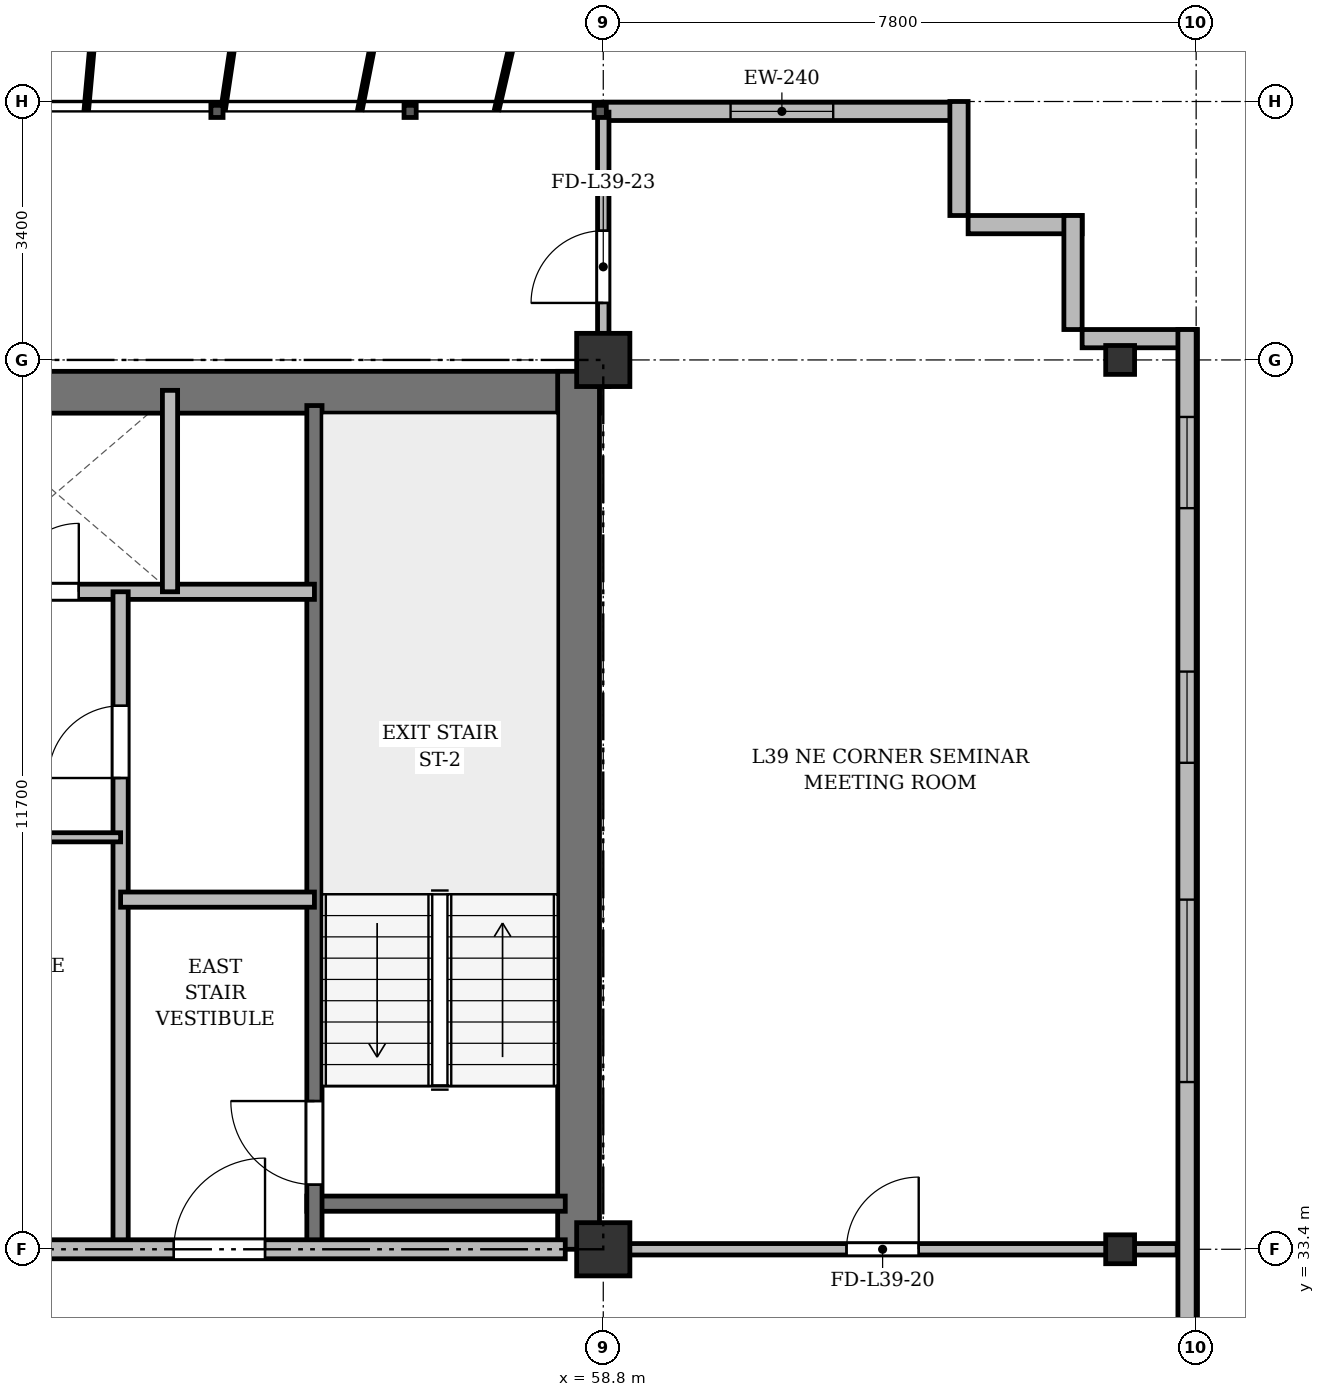
"""IFC4 building model, lengths in metres.
Left out: names, types, materials, properties, quantities, classifications, styles, units other than length and angle.
Written with IfcOpenShell. Run it as: python <this file> out.ifc"""

import sys

from ifc_helpers import new_model, si_unit, direction, frame, frame_2d, origin, origin_2d, place, context, subcontext, project, spatial, rectangle, i_section, extrude, source, transform, mapped, element, fill, save


model = new_model("IFC4")
c1 = context("Model", 3, precision=1e-05, world=origin(), true_north=direction((0.0, 1.0)))
c2 = subcontext(c1, "Body", "Model", "MODEL_VIEW")
j1 = project(units=[si_unit("LENGTHUNIT", "METRE"), si_unit("PLANEANGLEUNIT", "RADIAN")], contexts=[c1])
p1 = place(None, origin())
s1 = spatial("IfcSite", under=j1, at=p1, CompositionType="ELEMENT")
p2 = place(p1, origin())
s2 = spatial("IfcBuilding", under=s1, at=p2, CompositionType="ELEMENT")
p3 = place(p2, frame((0.0, 0.0, 150.1)))
s3 = spatial("IfcBuildingStorey", under=s2, at=p3, CompositionType="ELEMENT", Elevation=150.1)
m1 = source(origin(), c2, "Body", "SweptSolid", [
    extrude(rectangle(XDim=0.7, YDim=0.7, at=origin_2d()), origin(), (0.0, 0.0, 1.0), 3.6),
])
for number, where, z_axis, x_axis in (
    (1, (58.8, 33.4, 0.0), (0.0, 0.0, 1.0), (1.0, 0.0, 0.0)),
    (2, (58.8, 45.1, 0.0), (0.0, 0.0, 1.0), (1.0, 0.0, 0.0)),
):
    element("IfcColumn", number, at=place(p3, frame(where, z_axis=z_axis, x_axis=x_axis)), inside=s3, PredefinedType="COLUMN", context=c2, shape_type="MappedRepresentation", body=[
        mapped(m1, transform((0.0, 0.0, 0.0), x_axis=(1.0, 0.0, 0.0), y_axis=(0.0, 1.0, 0.0), z_axis=(0.0, 0.0, 1.0), scale=1.0)),
    ])
m2 = source(origin(), c2, "Body", "SweptSolid", [
    extrude(i_section(OverallWidth=0.38, OverallDepth=0.38, WebThickness=0.02, FlangeThickness=0.03, at=origin_2d()), origin(), (0.0, 0.0, 1.0), 3.6),
])
for number, where, z_axis, x_axis in (
    (3, (65.6, 33.4, 0.0), (0.0, 0.0, 1.0), (1.0, 0.0, 0.0)),
    (4, (65.6, 45.1, 0.0), (0.0, 0.0, 1.0), (1.0, 0.0, 0.0)),
):
    element("IfcColumn", number, at=place(p3, frame(where, z_axis=z_axis, x_axis=x_axis)), inside=s3, PredefinedType="COLUMN", context=c2, shape_type="MappedRepresentation", body=[
        mapped(m2, transform((0.0, 0.0, 0.0), x_axis=(1.0, 0.0, 0.0), y_axis=(0.0, 1.0, 0.0), z_axis=(0.0, 0.0, 1.0), scale=1.0)),
    ])
p4 = place(p3, frame((58.8, 48.37, 0.0), z_axis=(0.0, 0.0, 1.0), x_axis=(1.0, 0.0, 0.0)))
e5 = element("IfcWall", 5, at=p4, inside=s3, PredefinedType="SOLIDWALL", context=c2, shape_type="SweptSolid", body=[
    extrude(rectangle(XDim=4.7, YDim=0.24, at=frame_2d((2.35, 0.0))), origin(), (0.0, 0.0, 1.0), 3.35),
])
p5 = place(p4, frame((1.675, 0.0, 0.9)))
e6 = element("IfcOpeningElement", 6, at=p5, cuts=e5, PredefinedType="OPENING", context=c2, shape_type="SweptSolid", body=[
    extrude(rectangle(XDim=1.35, YDim=1.5, at=frame_2d((0.675, 0.75))), frame((0.0, 0.13, 0.0), z_axis=(0.0, -1.0, 0.0), x_axis=(1.0, 0.0, 0.0)), (0.0, 0.0, 1.0), 0.26),
])
for number, where, z_axis, x_axis in (
    (7, (63.48, 48.5, 0.0), (0.0, 0.0, 1.0), (0.0, -1.0, 0.0)),
    (8, (63.6, 46.88, 0.0), (0.0, 0.0, 1.0), (1.0, 0.0, 0.0)),
    (9, (64.98, 47.0, 0.0), (0.0, 0.0, 1.0), (0.0, -1.0, 0.0)),
    (10, (65.1, 45.38, 0.0), (0.0, 0.0, 1.0), (1.0, 0.0, 0.0)),
):
    element("IfcWall", number, at=place(p3, frame(where, z_axis=z_axis, x_axis=x_axis)), inside=s3, PredefinedType="SOLIDWALL", context=c2, shape_type="SweptSolid", body=[
        extrude(rectangle(XDim=1.5, YDim=0.24, at=frame_2d((0.75, 0.0))), origin(), (0.0, 0.0, 1.0), 3.35),
    ])
p6 = place(p3, frame((66.48, 45.5, 0.0), z_axis=(0.0, 0.0, 1.0), x_axis=(0.0, -1.0, 0.0)))
e11 = element("IfcWall", 11, at=p6, inside=s3, PredefinedType="SOLIDWALL", context=c2, shape_type="SweptSolid", body=[
    extrude(rectangle(XDim=39.2, YDim=0.24, at=frame_2d((19.6, 0.0))), origin(), (0.0, 0.0, 1.0), 3.35),
])
p7 = place(p6, frame((36.55, 0.0, 0.92)))
e12 = element("IfcOpeningElement", 12, at=p7, cuts=e11, PredefinedType="OPENING", context=c2, shape_type="SweptSolid", body=[
    extrude(rectangle(XDim=1.2, YDim=1.65, at=frame_2d((0.6, 0.825))), frame((0.0, 0.13, 0.0), z_axis=(0.0, -1.0, 0.0), x_axis=(1.0, 0.0, 0.0)), (0.0, 0.0, 1.0), 0.26),
])
p8 = place(p6, frame((32.9, 0.0, 0.92)))
e13 = element("IfcOpeningElement", 13, at=p8, cuts=e11, PredefinedType="OPENING", context=c2, shape_type="SweptSolid", body=[
    extrude(rectangle(XDim=2.4, YDim=2.1, at=frame_2d((1.2, 1.05))), frame((0.0, 0.13, 0.0), z_axis=(0.0, -1.0, 0.0), x_axis=(1.0, 0.0, 0.0)), (0.0, 0.0, 1.0), 0.26),
])
p9 = place(p6, frame((28.7, 0.0, 0.92)))
e14 = element("IfcOpeningElement", 14, at=p9, cuts=e11, PredefinedType="OPENING", context=c2, shape_type="SweptSolid", body=[
    extrude(rectangle(XDim=2.4, YDim=2.1, at=frame_2d((1.2, 1.05))), frame((0.0, 0.13, 0.0), z_axis=(0.0, -1.0, 0.0), x_axis=(1.0, 0.0, 0.0)), (0.0, 0.0, 1.0), 0.26),
])
p10 = place(p6, frame((21.5, 0.0, 0.92)))
e15 = element("IfcOpeningElement", 15, at=p10, cuts=e11, PredefinedType="OPENING", context=c2, shape_type="SweptSolid", body=[
    extrude(rectangle(XDim=2.4, YDim=2.1, at=frame_2d((1.2, 1.05))), frame((0.0, 0.13, 0.0), z_axis=(0.0, -1.0, 0.0), x_axis=(1.0, 0.0, 0.0)), (0.0, 0.0, 1.0), 0.26),
])
p11 = place(p6, frame((7.5, 0.0, 0.92)))
e16 = element("IfcOpeningElement", 16, at=p11, cuts=e11, PredefinedType="OPENING", context=c2, shape_type="SweptSolid", body=[
    extrude(rectangle(XDim=2.4, YDim=2.1, at=frame_2d((1.2, 1.05))), frame((0.0, 0.13, 0.0), z_axis=(0.0, -1.0, 0.0), x_axis=(1.0, 0.0, 0.0)), (0.0, 0.0, 1.0), 0.26),
])
p12 = place(p6, frame((4.5, 0.0, 0.92)))
e17 = element("IfcOpeningElement", 17, at=p12, cuts=e11, PredefinedType="OPENING", context=c2, shape_type="SweptSolid", body=[
    extrude(rectangle(XDim=1.2, YDim=1.65, at=frame_2d((0.6, 0.825))), frame((0.0, 0.13, 0.0), z_axis=(0.0, -1.0, 0.0), x_axis=(1.0, 0.0, 0.0)), (0.0, 0.0, 1.0), 0.26),
])
p13 = place(p6, frame((1.15, 0.0, 0.92)))
e18 = element("IfcOpeningElement", 18, at=p13, cuts=e11, PredefinedType="OPENING", context=c2, shape_type="SweptSolid", body=[
    extrude(rectangle(XDim=1.2, YDim=1.65, at=frame_2d((0.6, 0.825))), frame((0.0, 0.13, 0.0), z_axis=(0.0, -1.0, 0.0), x_axis=(1.0, 0.0, 0.0)), (0.0, 0.0, 1.0), 0.26),
])
p14 = place(p3, frame((15.65, 44.675, 0.0), z_axis=(0.0, 0.0, 1.0), x_axis=(1.0, 0.0, 0.0)))
e19 = element("IfcWall", 19, at=p14, inside=s3, PredefinedType="SHEAR", context=c2, shape_type="SweptSolid", body=[
    extrude(rectangle(XDim=43.1, YDim=0.55, at=frame_2d((21.55, 0.0))), origin(), (0.0, 0.0, 1.0), 3.35),
])
p15 = place(p3, frame((58.475, 33.4, 0.0), z_axis=(0.0, 0.0, 1.0), x_axis=(0.0, 1.0, 0.0)))
e20 = element("IfcWall", 20, at=p15, inside=s3, PredefinedType="SHEAR", context=c2, shape_type="SweptSolid", body=[
    extrude(rectangle(XDim=11.55, YDim=0.55, at=frame_2d((5.775, 0.0))), origin(), (0.0, 0.0, 1.0), 3.35),
])
p16 = place(p3, frame((54.9, 34.0, 0.0), z_axis=(0.0, 0.0, 1.0), x_axis=(1.0, 0.0, 0.0)))
e21 = element("IfcWall", 21, at=p16, inside=s3, PredefinedType="SHEAR", context=c2, shape_type="SweptSolid", body=[
    extrude(rectangle(XDim=3.4, YDim=0.2, at=frame_2d((1.7, 0.0))), origin(), (0.0, 0.0, 1.0), 3.35),
])
p17 = place(p3, frame((55.0, 33.4, 0.0), z_axis=(0.0, 0.0, 1.0), x_axis=(0.0, 1.0, 0.0)))
e22 = element("IfcWall", 22, at=p17, inside=s3, PredefinedType="SHEAR", context=c2, shape_type="SweptSolid", body=[
    extrude(rectangle(XDim=11.1, YDim=0.2, at=frame_2d((5.55, 0.0))), origin(), (0.0, 0.0, 1.0), 3.35),
])
p18 = place(p17, frame((0.85, 0.0, 0.0)))
e23 = element("IfcOpeningElement", 23, at=p18, cuts=e22, PredefinedType="OPENING", context=c2, shape_type="SweptSolid", body=[
    extrude(rectangle(XDim=1.1, YDim=2.15, at=frame_2d((0.55, 1.075))), frame((0.0, 0.11, 0.0), z_axis=(0.0, -1.0, 0.0), x_axis=(1.0, 0.0, 0.0)), (0.0, 0.0, 1.0), 0.22),
])
p19 = place(p3, frame((47.15, 42.05, 0.0), z_axis=(0.0, 0.0, 1.0), x_axis=(1.0, 0.0, 0.0)))
e24 = element("IfcWall", 24, at=p19, inside=s3, PredefinedType="SOLIDWALL", context=c2, shape_type="SweptSolid", body=[
    extrude(rectangle(XDim=7.85, YDim=0.2, at=frame_2d((3.925, 0.0))), origin(), (0.0, 0.0, 1.0), 2.85),
])
p20 = place(p19, frame((0.75, 0.0, 0.0)))
e25 = element("IfcOpeningElement", 25, at=p20, cuts=e24, PredefinedType="OPENING", context=c2, shape_type="SweptSolid", body=[
    extrude(rectangle(XDim=0.9, YDim=2.1, at=frame_2d((0.45, 1.05))), frame((0.0, 0.11, 0.0), z_axis=(0.0, -1.0, 0.0), x_axis=(1.0, 0.0, 0.0)), (0.0, 0.0, 1.0), 0.22),
])
p21 = place(p19, frame((3.85, 0.0, 0.0)))
e26 = element("IfcOpeningElement", 26, at=p21, cuts=e24, PredefinedType="OPENING", context=c2, shape_type="SweptSolid", body=[
    extrude(rectangle(XDim=0.9, YDim=2.1, at=frame_2d((0.45, 1.05))), frame((0.0, 0.11, 0.0), z_axis=(0.0, -1.0, 0.0), x_axis=(1.0, 0.0, 0.0)), (0.0, 0.0, 1.0), 0.22),
])
p22 = place(p3, frame((53.1, 42.05, 0.0), z_axis=(0.0, 0.0, 1.0), x_axis=(0.0, 1.0, 0.0)))
e27 = element("IfcWall", 27, at=p22, inside=s3, PredefinedType="SOLIDWALL", context=c2, shape_type="SweptSolid", body=[
    extrude(rectangle(XDim=2.65, YDim=0.2, at=frame_2d((1.325, 0.0))), origin(), (0.0, 0.0, 1.0), 3.35),
])
p23 = place(p3, frame((52.45, 33.4, 0.0), z_axis=(0.0, 0.0, 1.0), x_axis=(0.0, 1.0, 0.0)))
e28 = element("IfcWall", 28, at=p23, inside=s3, PredefinedType="PARTITIONING", context=c2, shape_type="SweptSolid", body=[
    extrude(rectangle(XDim=8.65, YDim=0.2, at=frame_2d((4.325, 0.0))), origin(), (0.0, 0.0, 1.0), 2.75),
])
p24 = place(p23, frame((6.2, 0.0, 0.0)))
e29 = element("IfcOpeningElement", 29, at=p24, cuts=e28, PredefinedType="OPENING", context=c2, shape_type="SweptSolid", body=[
    extrude(rectangle(XDim=0.95, YDim=2.15, at=frame_2d((0.475, 1.075))), frame((0.0, 0.11, 0.0), z_axis=(0.0, -1.0, 0.0), x_axis=(1.0, 0.0, 0.0)), (0.0, 0.0, 1.0), 0.22),
])
p25 = place(p3, frame((52.45, 38.0, 0.0), z_axis=(0.0, 0.0, 1.0), x_axis=(1.0, 0.0, 0.0)))
e30 = element("IfcWall", 30, at=p25, inside=s3, PredefinedType="PARTITIONING", context=c2, shape_type="SweptSolid", body=[
    extrude(rectangle(XDim=2.55, YDim=0.2, at=frame_2d((1.275, 0.0))), origin(), (0.0, 0.0, 1.0), 3.35),
])
p26 = place(p3, frame((49.32, 38.82, 0.0), z_axis=(0.0, 0.0, 1.0), x_axis=(1.0, 0.0, 0.0)))
e31 = element("IfcWall", 31, at=p26, inside=s3, PredefinedType="PARTITIONING", context=c2, shape_type="SweptSolid", body=[
    extrude(rectangle(XDim=3.13, YDim=0.12, at=frame_2d((1.565, 0.0))), origin(), (0.0, 0.0, 1.0), 2.85),
])
p27 = place(p3, frame((47.15, 33.4, 0.0), z_axis=(0.0, 0.0, 1.0), x_axis=(1.0, 0.0, 0.0)))
e32 = element("IfcWall", 32, at=p27, inside=s3, PredefinedType="PARTITIONING", context=c2, shape_type="SweptSolid", body=[
    extrude(rectangle(XDim=11.15, YDim=0.25, at=frame_2d((5.575, 0.0))), origin(), (0.0, 0.0, 1.0), 2.75),
])
p28 = place(p27, frame((0.7, 0.0, 0.0)))
e33 = element("IfcOpeningElement", 33, at=p28, cuts=e32, PredefinedType="OPENING", context=c2, shape_type="SweptSolid", body=[
    extrude(rectangle(XDim=0.95, YDim=2.15, at=frame_2d((0.475, 1.075))), frame((0.0, 0.135, 0.0), z_axis=(0.0, -1.0, 0.0), x_axis=(1.0, 0.0, 0.0)), (0.0, 0.0, 1.0), 0.27),
])
p29 = place(p27, frame((6.0, 0.0, 0.0)))
e34 = element("IfcOpeningElement", 34, at=p29, cuts=e32, PredefinedType="OPENING", context=c2, shape_type="SweptSolid", body=[
    extrude(rectangle(XDim=1.2, YDim=2.15, at=frame_2d((0.6, 1.075))), frame((0.0, 0.135, 0.0), z_axis=(0.0, -1.0, 0.0), x_axis=(1.0, 0.0, 0.0)), (0.0, 0.0, 1.0), 0.27),
])
p30 = place(p3, frame((58.8, 33.4, 0.0), z_axis=(0.0, 0.0, 1.0), x_axis=(1.0, 0.0, 0.0)))
e35 = element("IfcWall", 35, at=p30, inside=s3, PredefinedType="PARTITIONING", context=c2, shape_type="SweptSolid", body=[
    extrude(rectangle(XDim=7.55, YDim=0.15, at=frame_2d((3.775, 0.0))), origin(), (0.0, 0.0, 1.0), 2.75),
])
p31 = place(p30, frame((3.2, 0.0, 0.0)))
e36 = element("IfcOpeningElement", 36, at=p31, cuts=e35, PredefinedType="OPENING", context=c2, shape_type="SweptSolid", body=[
    extrude(rectangle(XDim=0.95, YDim=2.15, at=frame_2d((0.475, 1.075))), frame((0.0, 0.085, 0.0), z_axis=(0.0, -1.0, 0.0), x_axis=(1.0, 0.0, 0.0)), (0.0, 0.0, 1.0), 0.17),
])
p32 = place(p3, frame((58.8, 44.75, 0.0), z_axis=(0.0, 0.0, 1.0), x_axis=(0.0, 1.0, 0.0)))
e37 = element("IfcWall", 37, at=p32, inside=s3, PredefinedType="PARTITIONING", context=c2, shape_type="SweptSolid", body=[
    extrude(rectangle(XDim=3.61, YDim=0.15, at=frame_2d((1.805, 0.0))), origin(), (0.0, 0.0, 1.0), 2.85),
])
p33 = place(p32, frame((1.1, 0.0, 0.0)))
e38 = element("IfcOpeningElement", 38, at=p33, cuts=e37, PredefinedType="OPENING", context=c2, shape_type="SweptSolid", body=[
    extrude(rectangle(XDim=0.95, YDim=2.15, at=frame_2d((0.475, 1.075))), frame((0.0, 0.085, 0.0), z_axis=(0.0, -1.0, 0.0), x_axis=(1.0, 0.0, 0.0)), (0.0, 0.0, 1.0), 0.17),
])
m3 = source(origin(), c2, "Body", "SweptSolid", [
    extrude(rectangle(XDim=1.35, YDim=1.5, at=frame_2d((0.675, 0.75))), frame((0.0, 0.03, 0.0), z_axis=(0.0, -1.0, 0.0), x_axis=(1.0, 0.0, 0.0)), (0.0, 0.0, 1.0), 0.06),
])
p34 = place(p5, origin())
e39 = element("IfcWindow", 39, at=p34, inside=s3, PartitioningType="SINGLE_PANEL", PredefinedType="WINDOW", context=c2, shape_type="MappedRepresentation", body=[
    mapped(m3, transform((0.0, 0.0, 0.0), x_axis=(1.0, 0.0, 0.0), y_axis=(0.0, 1.0, 0.0), z_axis=(0.0, 0.0, 1.0), scale=1.0)),
])
fill(e6, e39)
m4 = source(origin(), c2, "Body", "SweptSolid", [
    extrude(rectangle(XDim=2.4, YDim=2.1, at=frame_2d((1.2, 1.05))), frame((0.0, 0.03, 0.0), z_axis=(0.0, -1.0, 0.0), x_axis=(1.0, 0.0, 0.0)), (0.0, 0.0, 1.0), 0.06),
])
p35 = place(p11, origin())
e40 = element("IfcWindow", 40, at=p35, inside=s3, PartitioningType="SINGLE_PANEL", PredefinedType="WINDOW", context=c2, shape_type="MappedRepresentation", body=[
    mapped(m4, transform((0.0, 0.0, 0.0), x_axis=(1.0, 0.0, 0.0), y_axis=(0.0, 1.0, 0.0), z_axis=(0.0, 0.0, 1.0), scale=1.0)),
])
fill(e16, e40)
m5 = source(origin(), c2, "Body", "SweptSolid", [
    extrude(rectangle(XDim=1.2, YDim=1.65, at=frame_2d((0.6, 0.825))), frame((0.0, 0.03, 0.0), z_axis=(0.0, -1.0, 0.0), x_axis=(1.0, 0.0, 0.0)), (0.0, 0.0, 1.0), 0.06),
])
p36 = place(p12, origin())
e41 = element("IfcWindow", 41, at=p36, inside=s3, PartitioningType="SINGLE_PANEL", PredefinedType="WINDOW", context=c2, shape_type="MappedRepresentation", body=[
    mapped(m5, transform((0.0, 0.0, 0.0), x_axis=(1.0, 0.0, 0.0), y_axis=(0.0, 1.0, 0.0), z_axis=(0.0, 0.0, 1.0), scale=1.0)),
])
fill(e17, e41)
p37 = place(p13, origin())
e42 = element("IfcWindow", 42, at=p37, inside=s3, PartitioningType="SINGLE_PANEL", PredefinedType="WINDOW", context=c2, shape_type="MappedRepresentation", body=[
    mapped(m5, transform((0.0, 0.0, 0.0), x_axis=(1.0, 0.0, 0.0), y_axis=(0.0, 1.0, 0.0), z_axis=(0.0, 0.0, 1.0), scale=1.0)),
])
fill(e18, e42)
m6 = source(origin(), c2, "Body", "SweptSolid", [
    extrude(rectangle(XDim=1.1, YDim=2.15, at=frame_2d((0.55, 1.075))), frame((0.0, 0.025, 0.0), z_axis=(0.0, -1.0, 0.0), x_axis=(1.0, 0.0, 0.0)), (0.0, 0.0, 1.0), 0.05),
])
p38 = place(p18, origin())
e43 = element("IfcDoor", 43, at=p38, inside=s3, OperationType="SINGLE_SWING_RIGHT", PredefinedType="DOOR", context=c2, shape_type="MappedRepresentation", body=[
    mapped(m6, transform((0.0, 0.0, 0.0), x_axis=(1.0, 0.0, 0.0), y_axis=(0.0, 1.0, 0.0), z_axis=(0.0, 0.0, 1.0), scale=1.0)),
])
fill(e23, e43)
m7 = source(origin(), c2, "Body", "SweptSolid", [
    extrude(rectangle(XDim=0.9, YDim=2.1, at=frame_2d((0.45, 1.05))), frame((0.0, 0.025, 0.0), z_axis=(0.0, -1.0, 0.0), x_axis=(1.0, 0.0, 0.0)), (0.0, 0.0, 1.0), 0.05),
])
p39 = place(p21, origin())
e44 = element("IfcDoor", 44, at=p39, inside=s3, OperationType="SINGLE_SWING_RIGHT", PredefinedType="DOOR", context=c2, shape_type="MappedRepresentation", body=[
    mapped(m7, transform((0.0, 0.0, 0.0), x_axis=(1.0, 0.0, 0.0), y_axis=(0.0, 1.0, 0.0), z_axis=(0.0, 0.0, 1.0), scale=1.0)),
])
fill(e26, e44)
m8 = source(origin(), c2, "Body", "SweptSolid", [
    extrude(rectangle(XDim=0.95, YDim=2.15, at=frame_2d((0.475, 1.075))), frame((0.0, 0.025, 0.0), z_axis=(0.0, -1.0, 0.0), x_axis=(1.0, 0.0, 0.0)), (0.0, 0.0, 1.0), 0.05),
])
p40 = place(p24, origin())
e45 = element("IfcDoor", 45, at=p40, inside=s3, OperationType="SINGLE_SWING_LEFT", PredefinedType="DOOR", context=c2, shape_type="MappedRepresentation", body=[
    mapped(m8, transform((0.0, 0.0, 0.0), x_axis=(1.0, 0.0, 0.0), y_axis=(0.0, 1.0, 0.0), z_axis=(0.0, 0.0, 1.0), scale=1.0)),
])
fill(e29, e45)
m9 = source(origin(), c2, "Body", "SweptSolid", [
    extrude(rectangle(XDim=1.2, YDim=2.15, at=frame_2d((0.6, 1.075))), frame((0.0, 0.025, 0.0), z_axis=(0.0, -1.0, 0.0), x_axis=(1.0, 0.0, 0.0)), (0.0, 0.0, 1.0), 0.05),
])
p41 = place(p29, origin())
e46 = element("IfcDoor", 46, at=p41, inside=s3, OperationType="SINGLE_SWING_RIGHT", PredefinedType="DOOR", context=c2, shape_type="MappedRepresentation", body=[
    mapped(m9, transform((0.0, 0.0, 0.0), x_axis=(1.0, 0.0, 0.0), y_axis=(0.0, 1.0, 0.0), z_axis=(0.0, 0.0, 1.0), scale=1.0)),
])
fill(e34, e46)
p42 = place(p31, origin())
e47 = element("IfcDoor", 47, at=p42, inside=s3, OperationType="SINGLE_SWING_RIGHT", PredefinedType="DOOR", context=c2, shape_type="MappedRepresentation", body=[
    mapped(m8, transform((0.0, 0.0, 0.0), x_axis=(1.0, 0.0, 0.0), y_axis=(0.0, 1.0, 0.0), z_axis=(0.0, 0.0, 1.0), scale=1.0)),
])
fill(e36, e47)
p43 = place(p33, origin())
e48 = element("IfcDoor", 48, at=p43, inside=s3, OperationType="SINGLE_SWING_LEFT", PredefinedType="DOOR", context=c2, shape_type="MappedRepresentation", body=[
    mapped(m8, transform((0.0, 0.0, 0.0), x_axis=(1.0, 0.0, 0.0), y_axis=(0.0, 1.0, 0.0), z_axis=(0.0, 0.0, 1.0), scale=1.0)),
])
fill(e38, e48)
save(model, sys.argv[1])
